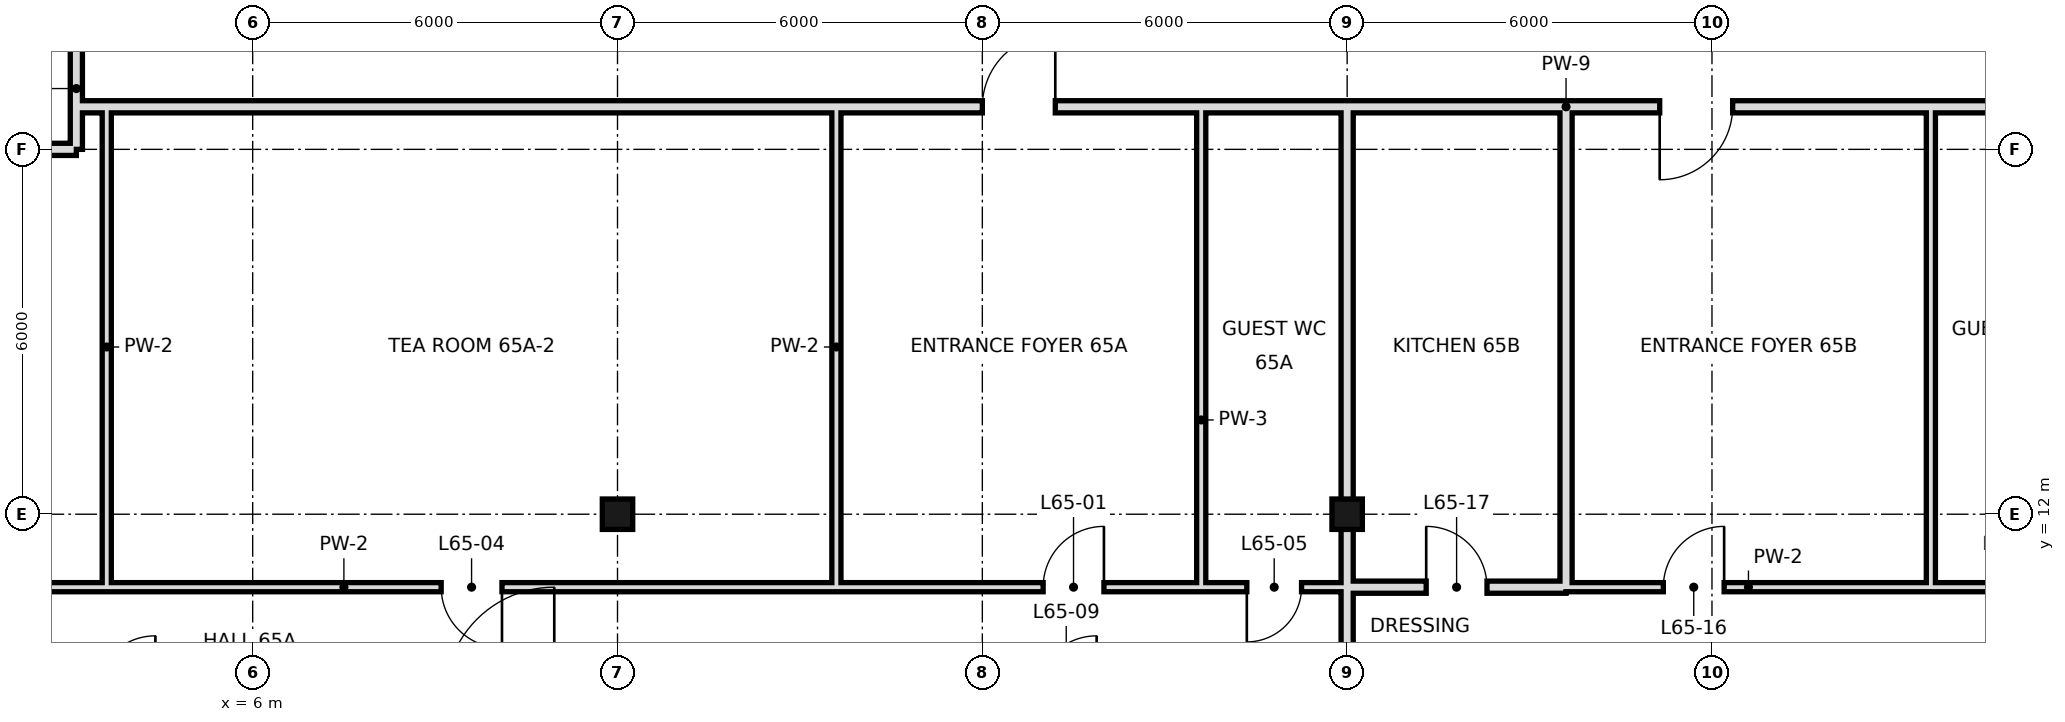
"""IFC4 building model, lengths in metres.
Left out: names, types, materials, properties, quantities, classifications, styles, units other than length and angle.
Written with IfcOpenShell. Run it as: python <this file> out.ifc"""

import sys

from ifc_helpers import new_model, si_unit, direction, frame, frame_2d, origin, origin_2d, place, context, subcontext, project, spatial, rectangle, hollow_rectangle, extrude, element, fill, save


model = new_model("IFC4")
c1 = context("Model", 3, precision=1e-05, world=origin(), true_north=direction((0.0, 1.0)))
c2 = subcontext(c1, "Body", "Model", "MODEL_VIEW")
j1 = project(units=[si_unit("LENGTHUNIT", "METRE"), si_unit("PLANEANGLEUNIT", "RADIAN")], contexts=[c1])
p1 = place(None, origin())
s1 = spatial("IfcSite", under=j1, at=p1, CompositionType="ELEMENT")
p2 = place(p1, origin())
s2 = spatial("IfcBuilding", under=s1, at=p2, CompositionType="ELEMENT")
p3 = place(p2, frame((0.0, 0.0, 273.8)))
s3 = spatial("IfcBuildingStorey", under=s2, at=p3, CompositionType="ELEMENT", Elevation=273.8)
for number, where, z_axis, x_axis in (
    (1, (12.0, 12.0, 0.0), (0.0, 0.0, 1.0), (1.0, 0.0, 0.0)),
    (2, (24.0, 12.0, 0.0), (0.0, 0.0, 1.0), (1.0, 0.0, 0.0)),
):
    element("IfcColumn", number, at=place(p3, frame(where, z_axis=z_axis, x_axis=x_axis)), inside=s3, PredefinedType="COLUMN", context=c2, shape_type="SweptSolid", body=[
        extrude(hollow_rectangle(XDim=0.5, YDim=0.5, WallThickness=0.025, at=origin_2d()), origin(), (0.0, 0.0, 1.0), 3.6),
    ])
for number, where, z_axis, x_axis in (
    (3, (15.6, 10.8, 0.0), (0.0, 0.0, 1.0), (0.0, 1.0, 0.0)),
    (4, (21.6, 10.8, 0.0), (0.0, 0.0, 1.0), (0.0, 1.0, 0.0)),
):
    element("IfcWall", number, at=place(p3, frame(where, z_axis=z_axis, x_axis=x_axis)), inside=s3, PredefinedType="PARTITIONING", context=c2, shape_type="SweptSolid", body=[
        extrude(rectangle(XDim=7.9, YDim=0.15, at=frame_2d((3.95, 0.0))), origin(), (0.0, 0.0, 1.0), 3.42),
    ])
p4 = place(p3, frame((24.0, 10.8, 0.0), z_axis=(0.0, 0.0, 1.0), x_axis=(0.0, 1.0, 0.0)))
e5 = element("IfcWall", 5, at=p4, inside=s3, PredefinedType="SOLIDWALL", context=c2, shape_type="SweptSolid", body=[
    extrude(rectangle(XDim=7.9, YDim=0.2, at=frame_2d((3.95, 0.0))), origin(), (0.0, 0.0, 1.0), 2.72),
])
p5 = place(p3, frame((24.0, 0.0, 0.0), z_axis=(0.0, 0.0, 1.0), x_axis=(0.0, 1.0, 0.0)))
e6 = element("IfcWall", 6, at=p5, inside=s3, PredefinedType="SOLIDWALL", context=c2, shape_type="SweptSolid", body=[
    extrude(rectangle(XDim=10.8, YDim=0.2, at=frame_2d((5.4, 0.0))), origin(), (0.0, 0.0, 1.0), 2.72),
])
p6 = place(p3, frame((27.6, 10.8, 0.0), z_axis=(0.0, 0.0, 1.0), x_axis=(0.0, 1.0, 0.0)))
e7 = element("IfcWall", 7, at=p6, inside=s3, PredefinedType="SOLIDWALL", context=c2, shape_type="SweptSolid", body=[
    extrude(rectangle(XDim=7.9, YDim=0.2, at=frame_2d((3.95, 0.0))), origin(), (0.0, 0.0, 1.0), 2.72),
])
p7 = place(p3, frame((3.1, 18.7, 0.0), z_axis=(0.0, 0.0, 1.0), x_axis=(0.0, 1.0, 0.0)))
e8 = element("IfcWall", 8, at=p7, inside=s3, PredefinedType="SOLIDWALL", context=c2, shape_type="SweptSolid", body=[
    extrude(rectangle(XDim=21.5, YDim=0.2, at=frame_2d((10.75, 0.0))), origin(), (0.0, 0.0, 1.0), 2.97),
])
p8 = place(p7, frame((6.5, 0.0, 0.0)))
e9 = element("IfcOpeningElement", 9, at=p8, cuts=e8, PredefinedType="OPENING", context=c2, shape_type="SweptSolid", body=[
    extrude(rectangle(XDim=1.2, YDim=2.4, at=frame_2d((0.6, 1.2))), frame((0.0, 0.11, 0.0), z_axis=(0.0, -1.0, 0.0), x_axis=(1.0, 0.0, 0.0)), (0.0, 0.0, 1.0), 0.22),
])
p9 = place(p3, frame((3.1, 18.0, 0.0), z_axis=(0.0, 0.0, 1.0), x_axis=(0.0, 1.0, 0.0)))
e10 = element("IfcWall", 10, at=p9, inside=s3, PredefinedType="SOLIDWALL", context=c2, shape_type="SweptSolid", body=[
    extrude(rectangle(XDim=0.7, YDim=0.2, at=frame_2d((0.35, 0.0))), origin(), (0.0, 0.0, 1.0), 2.97),
])
for number, where, z_axis, x_axis in (
    (11, (3.6, 10.8, 0.0), (0.0, 0.0, 1.0), (0.0, 1.0, 0.0)),
    (12, (33.6, 10.8, 0.0), (0.0, 0.0, 1.0), (0.0, 1.0, 0.0)),
):
    element("IfcWall", number, at=place(p3, frame(where, z_axis=z_axis, x_axis=x_axis)), inside=s3, PredefinedType="PARTITIONING", context=c2, shape_type="SweptSolid", body=[
        extrude(rectangle(XDim=7.9, YDim=0.15, at=frame_2d((3.95, 0.0))), origin(), (0.0, 0.0, 1.0), 3.42),
    ])
p10 = place(p3, frame((24.0, 10.8, 0.0), z_axis=(0.0, 0.0, 1.0), x_axis=(1.0, 0.0, 0.0)))
e13 = element("IfcWall", 13, at=p10, inside=s3, PredefinedType="SOLIDWALL", context=c2, shape_type="SweptSolid", body=[
    extrude(rectangle(XDim=3.6, YDim=0.2, at=frame_2d((1.8, 0.0))), origin(), (0.0, 0.0, 1.0), 2.72),
])
p11 = place(p10, frame((1.3, 0.0, 0.0)))
e14 = element("IfcOpeningElement", 14, at=p11, cuts=e13, PredefinedType="OPENING", context=c2, shape_type="SweptSolid", body=[
    extrude(rectangle(XDim=1.0, YDim=2.4, at=frame_2d((0.5, 1.2))), frame((0.0, 0.11, 0.0), z_axis=(0.0, -1.0, 0.0), x_axis=(1.0, 0.0, 0.0)), (0.0, 0.0, 1.0), 0.22),
])
p12 = place(p3, frame((-6.6, 10.8, 0.0), z_axis=(0.0, 0.0, 1.0), x_axis=(1.0, 0.0, 0.0)))
e15 = element("IfcWall", 15, at=p12, inside=s3, PredefinedType="PARTITIONING", context=c2, shape_type="SweptSolid", body=[
    extrude(rectangle(XDim=28.2, YDim=0.15, at=frame_2d((14.1, 0.0))), origin(), (0.0, 0.0, 1.0), 3.42),
])
p13 = place(p12, frame((25.6, 0.0, 0.0)))
e16 = element("IfcOpeningElement", 16, at=p13, cuts=e15, PredefinedType="OPENING", context=c2, shape_type="SweptSolid", body=[
    extrude(rectangle(XDim=1.0, YDim=2.4, at=frame_2d((0.5, 1.2))), frame((0.0, 0.085, 0.0), z_axis=(0.0, -1.0, 0.0), x_axis=(1.0, 0.0, 0.0)), (0.0, 0.0, 1.0), 0.17),
])
p14 = place(p12, frame((4.6, 0.0, 0.0)))
e17 = element("IfcOpeningElement", 17, at=p14, cuts=e15, PredefinedType="OPENING", context=c2, shape_type="SweptSolid", body=[
    extrude(rectangle(XDim=1.0, YDim=2.4, at=frame_2d((0.5, 1.2))), frame((0.0, 0.085, 0.0), z_axis=(0.0, -1.0, 0.0), x_axis=(1.0, 0.0, 0.0)), (0.0, 0.0, 1.0), 0.17),
])
p15 = place(p12, frame((15.7, 0.0, 0.0)))
e18 = element("IfcOpeningElement", 18, at=p15, cuts=e15, PredefinedType="OPENING", context=c2, shape_type="SweptSolid", body=[
    extrude(rectangle(XDim=1.0, YDim=2.4, at=frame_2d((0.5, 1.2))), frame((0.0, 0.085, 0.0), z_axis=(0.0, -1.0, 0.0), x_axis=(1.0, 0.0, 0.0)), (0.0, 0.0, 1.0), 0.17),
])
p16 = place(p3, frame((27.6, 10.8, 0.0), z_axis=(0.0, 0.0, 1.0), x_axis=(1.0, 0.0, 0.0)))
e19 = element("IfcWall", 19, at=p16, inside=s3, PredefinedType="PARTITIONING", context=c2, shape_type="SweptSolid", body=[
    extrude(rectangle(XDim=6.0, YDim=0.15, at=frame_2d((3.0, 0.0))), origin(), (0.0, 0.0, 1.0), 3.42),
])
p17 = place(p16, frame((1.6, 0.0, 0.0)))
e20 = element("IfcOpeningElement", 20, at=p17, cuts=e19, PredefinedType="OPENING", context=c2, shape_type="SweptSolid", body=[
    extrude(rectangle(XDim=1.0, YDim=2.4, at=frame_2d((0.5, 1.2))), frame((0.0, 0.085, 0.0), z_axis=(0.0, -1.0, 0.0), x_axis=(1.0, 0.0, 0.0)), (0.0, 0.0, 1.0), 0.17),
])
p18 = place(p3, frame((21.6, 10.8, 0.0), z_axis=(0.0, 0.0, 1.0), x_axis=(1.0, 0.0, 0.0)))
e21 = element("IfcWall", 21, at=p18, inside=s3, PredefinedType="PARTITIONING", context=c2, shape_type="SweptSolid", body=[
    extrude(rectangle(XDim=2.4, YDim=0.15, at=frame_2d((1.2, 0.0))), origin(), (0.0, 0.0, 1.0), 3.42),
])
p19 = place(p18, frame((0.75, 0.0, 0.0)))
e22 = element("IfcOpeningElement", 22, at=p19, cuts=e21, PredefinedType="OPENING", context=c2, shape_type="SweptSolid", body=[
    extrude(rectangle(XDim=0.9, YDim=2.4, at=frame_2d((0.45, 1.2))), frame((0.0, 0.085, 0.0), z_axis=(0.0, -1.0, 0.0), x_axis=(1.0, 0.0, 0.0)), (0.0, 0.0, 1.0), 0.17),
])
p20 = place(p3, frame((33.6, 10.8, 0.0), z_axis=(0.0, 0.0, 1.0), x_axis=(1.0, 0.0, 0.0)))
e23 = element("IfcWall", 23, at=p20, inside=s3, PredefinedType="PARTITIONING", context=c2, shape_type="SweptSolid", body=[
    extrude(rectangle(XDim=2.4, YDim=0.15, at=frame_2d((1.2, 0.0))), origin(), (0.0, 0.0, 1.0), 3.42),
])
p21 = place(p20, frame((0.95, 0.0, 0.0)))
e24 = element("IfcOpeningElement", 24, at=p21, cuts=e23, PredefinedType="OPENING", context=c2, shape_type="SweptSolid", body=[
    extrude(rectangle(XDim=0.9, YDim=2.4, at=frame_2d((0.45, 1.2))), frame((0.0, 0.085, 0.0), z_axis=(0.0, -1.0, 0.0), x_axis=(1.0, 0.0, 0.0)), (0.0, 0.0, 1.0), 0.17),
])
p22 = place(p3, frame((-6.6, 18.0, 0.0), z_axis=(0.0, 0.0, 1.0), x_axis=(1.0, 0.0, 0.0)))
e25 = element("IfcWall", 25, at=p22, inside=s3, PredefinedType="SOLIDWALL", context=c2, shape_type="SweptSolid", body=[
    extrude(rectangle(XDim=9.7, YDim=0.2, at=frame_2d((4.85, 0.0))), origin(), (0.0, 0.0, 1.0), 2.72),
])
p23 = place(p3, frame((3.1, 18.7, 0.0), z_axis=(0.0, 0.0, 1.0), x_axis=(1.0, 0.0, 0.0)))
e26 = element("IfcWall", 26, at=p23, inside=s3, PredefinedType="SOLIDWALL", context=c2, shape_type="SweptSolid", body=[
    extrude(rectangle(XDim=20.9, YDim=0.2, at=frame_2d((10.45, 0.0))), origin(), (0.0, 0.0, 1.0), 2.72),
])
p24 = place(p23, frame((14.9, 0.0, 0.0)))
e27 = element("IfcOpeningElement", 27, at=p24, cuts=e26, PredefinedType="OPENING", context=c2, shape_type="SweptSolid", body=[
    extrude(rectangle(XDim=1.2, YDim=2.4, at=frame_2d((0.6, 1.2))), frame((0.0, 0.11, 0.0), z_axis=(0.0, -1.0, 0.0), x_axis=(1.0, 0.0, 0.0)), (0.0, 0.0, 1.0), 0.22),
])
p25 = place(p3, frame((27.6, 18.7, 0.0), z_axis=(0.0, 0.0, 1.0), x_axis=(1.0, 0.0, 0.0)))
e28 = element("IfcWall", 28, at=p25, inside=s3, PredefinedType="SOLIDWALL", context=c2, shape_type="SweptSolid", body=[
    extrude(rectangle(XDim=17.3, YDim=0.2, at=frame_2d((8.65, 0.0))), origin(), (0.0, 0.0, 1.0), 2.72),
])
p26 = place(p25, frame((1.54, 0.0, 0.0)))
e29 = element("IfcOpeningElement", 29, at=p26, cuts=e28, PredefinedType="OPENING", context=c2, shape_type="SweptSolid", body=[
    extrude(rectangle(XDim=1.2, YDim=2.4, at=frame_2d((0.6, 1.2))), frame((0.0, 0.11, 0.0), z_axis=(0.0, -1.0, 0.0), x_axis=(1.0, 0.0, 0.0)), (0.0, 0.0, 1.0), 0.22),
])
p27 = place(p3, frame((24.0, 18.7, 0.0), z_axis=(0.0, 0.0, 1.0), x_axis=(1.0, 0.0, 0.0)))
e30 = element("IfcWall", 30, at=p27, inside=s3, PredefinedType="SOLIDWALL", context=c2, shape_type="SweptSolid", body=[
    extrude(rectangle(XDim=3.6, YDim=0.2, at=frame_2d((1.8, 0.0))), origin(), (0.0, 0.0, 1.0), 3.42),
])
p28 = place(p13, frame((1.0, 0.0, 0.0), z_axis=(0.0, 0.0, 1.0), x_axis=(-1.0, 0.0, 0.0)))
e31 = element("IfcDoor", 31, at=p28, inside=s3, OperationType="SINGLE_SWING_LEFT", PredefinedType="DOOR", context=c2, shape_type="SweptSolid", body=[
    extrude(rectangle(XDim=1.0, YDim=2.4, at=frame_2d((0.5, 1.2))), frame((0.0, 0.025, 0.0), z_axis=(0.0, -1.0, 0.0), x_axis=(1.0, 0.0, 0.0)), (0.0, 0.0, 1.0), 0.05),
])
fill(e16, e31)
p29 = place(p15, origin())
e32 = element("IfcDoor", 32, at=p29, inside=s3, OperationType="SINGLE_SWING_RIGHT", PredefinedType="DOOR", context=c2, shape_type="SweptSolid", body=[
    extrude(rectangle(XDim=1.0, YDim=2.4, at=frame_2d((0.5, 1.2))), frame((0.0, 0.025, 0.0), z_axis=(0.0, -1.0, 0.0), x_axis=(1.0, 0.0, 0.0)), (0.0, 0.0, 1.0), 0.05),
])
fill(e18, e32)
p30 = place(p19, frame((0.9, 0.0, 0.0), z_axis=(0.0, 0.0, 1.0), x_axis=(-1.0, 0.0, 0.0)))
e33 = element("IfcDoor", 33, at=p30, inside=s3, OperationType="SINGLE_SWING_RIGHT", PredefinedType="DOOR", context=c2, shape_type="SweptSolid", body=[
    extrude(rectangle(XDim=0.9, YDim=2.4, at=frame_2d((0.45, 1.2))), frame((0.0, 0.025, 0.0), z_axis=(0.0, -1.0, 0.0), x_axis=(1.0, 0.0, 0.0)), (0.0, 0.0, 1.0), 0.05),
])
fill(e22, e33)
p31 = place(p17, frame((1.0, 0.0, 0.0), z_axis=(0.0, 0.0, 1.0), x_axis=(-1.0, 0.0, 0.0)))
e34 = element("IfcDoor", 34, at=p31, inside=s3, OperationType="SINGLE_SWING_LEFT", PredefinedType="DOOR", context=c2, shape_type="SweptSolid", body=[
    extrude(rectangle(XDim=1.0, YDim=2.4, at=frame_2d((0.5, 1.2))), frame((0.0, 0.025, 0.0), z_axis=(0.0, -1.0, 0.0), x_axis=(1.0, 0.0, 0.0)), (0.0, 0.0, 1.0), 0.05),
])
fill(e20, e34)
p32 = place(p11, origin())
e35 = element("IfcDoor", 35, at=p32, inside=s3, OperationType="SINGLE_SWING_LEFT", PredefinedType="DOOR", context=c2, shape_type="SweptSolid", body=[
    extrude(rectangle(XDim=1.0, YDim=2.4, at=frame_2d((0.5, 1.2))), frame((0.0, 0.025, 0.0), z_axis=(0.0, -1.0, 0.0), x_axis=(1.0, 0.0, 0.0)), (0.0, 0.0, 1.0), 0.05),
])
fill(e14, e35)
p33 = place(p24, frame((1.2, 0.0, 0.0), z_axis=(0.0, 0.0, 1.0), x_axis=(-1.0, 0.0, 0.0)))
e36 = element("IfcDoor", 36, at=p33, inside=s3, OperationType="SINGLE_SWING_LEFT", PredefinedType="DOOR", context=c2, shape_type="SweptSolid", body=[
    extrude(rectangle(XDim=1.2, YDim=2.4, at=frame_2d((0.6, 1.2))), frame((0.0, 0.025, 0.0), z_axis=(0.0, -1.0, 0.0), x_axis=(1.0, 0.0, 0.0)), (0.0, 0.0, 1.0), 0.05),
])
fill(e27, e36)
p34 = place(p26, frame((1.2, 0.0, 0.0), z_axis=(0.0, 0.0, 1.0), x_axis=(-1.0, 0.0, 0.0)))
e37 = element("IfcDoor", 37, at=p34, inside=s3, OperationType="SINGLE_SWING_RIGHT", PredefinedType="DOOR", context=c2, shape_type="SweptSolid", body=[
    extrude(rectangle(XDim=1.2, YDim=2.4, at=frame_2d((0.6, 1.2))), frame((0.0, 0.025, 0.0), z_axis=(0.0, -1.0, 0.0), x_axis=(1.0, 0.0, 0.0)), (0.0, 0.0, 1.0), 0.05),
])
fill(e29, e37)
save(model, sys.argv[1])
